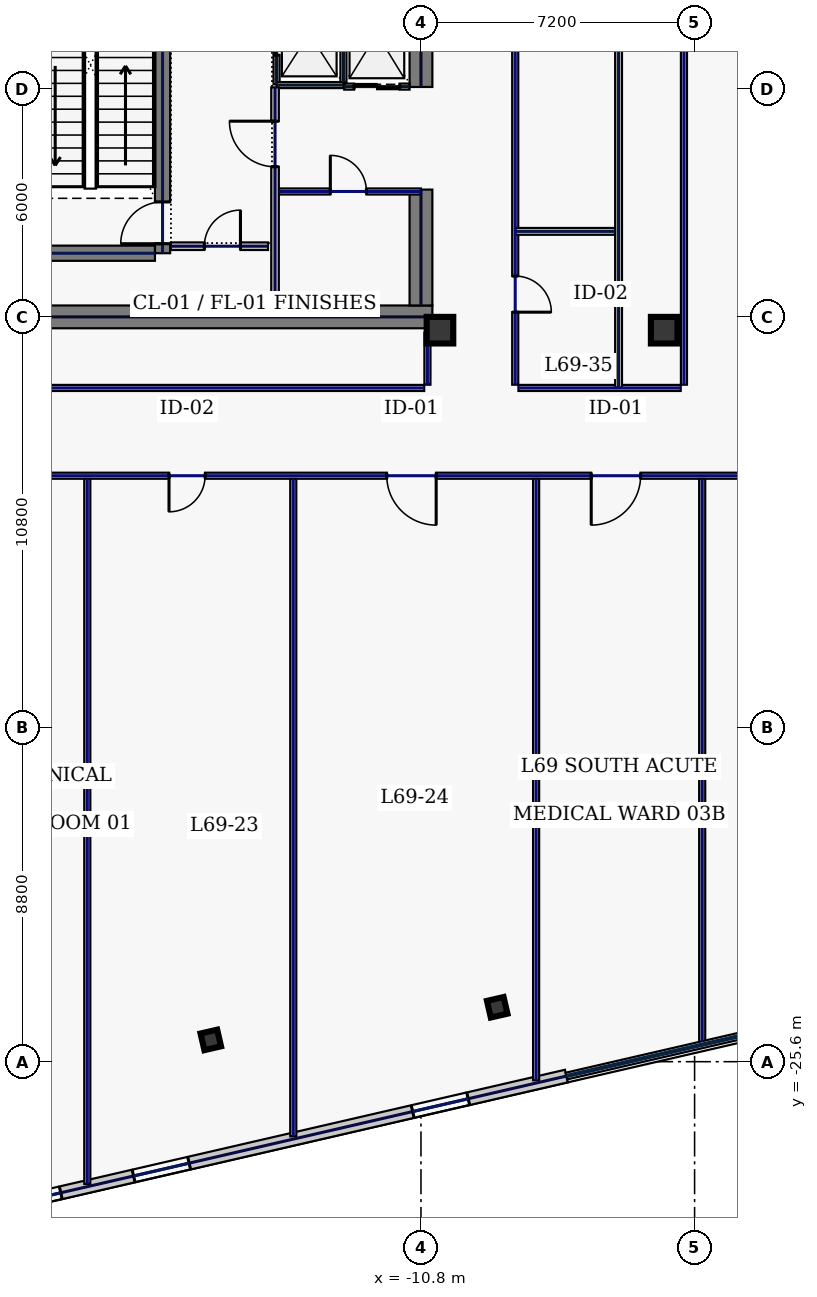
"""IFC4 building model, lengths in metres.
Left out: names, types, materials, properties, quantities, classifications, styles, units other than length and angle.
Written with IfcOpenShell. Run it as: python <this file> out.ifc"""

import sys

from ifc_helpers import new_model, si_unit, direction, frame, frame_2d, origin, origin_2d, place, context, subcontext, project, spatial, rectangle, hollow_rectangle, extrude, element, fill, save


model = new_model("IFC4")
c1 = context("Model", 3, precision=1e-05, world=origin(), true_north=direction((0.0, 1.0)))
c2 = subcontext(c1, "Body", "Model", "MODEL_VIEW")
j1 = project(units=[si_unit("LENGTHUNIT", "METRE"), si_unit("PLANEANGLEUNIT", "RADIAN")], contexts=[c1])
p1 = place(None, origin())
s1 = spatial("IfcSite", under=j1, at=p1, CompositionType="ELEMENT")
p2 = place(p1, origin())
s2 = spatial("IfcBuilding", under=s1, at=p2, CompositionType="ELEMENT")
p3 = place(p2, frame((0.0, 0.0, 297.0)))
s3 = spatial("IfcBuildingStorey", under=s2, at=p3, CompositionType="ELEMENT", Elevation=297.0)
p4 = place(p3, frame((-22.0, -6.0, 0.0), z_axis=(0.0, 0.0, 1.0), x_axis=(1.0, 0.0, 0.0)))
e1 = element("IfcWall", 1, at=p4, inside=s3, PredefinedType="SHEAR", context=c2, shape_type="SweptSolid", body=[
    extrude(rectangle(XDim=11.5, YDim=0.6, at=frame_2d((5.75, 0.0))), origin(), (0.0, 0.0, 1.0), 3.74),
])
p5 = place(p3, frame((-10.8, -5.7, 0.0), z_axis=(0.0, 0.0, 1.0), x_axis=(0.0, 1.0, 0.0)))
e2 = element("IfcWall", 2, at=p5, inside=s3, PredefinedType="SHEAR", context=c2, shape_type="SweptSolid", body=[
    extrude(rectangle(XDim=3.05, YDim=0.6, at=frame_2d((1.525, 0.0))), origin(), (0.0, 0.0, 1.0), 3.74),
])
p6 = place(p3, frame((-10.8, 0.05, 0.0), z_axis=(0.0, 0.0, 1.0), x_axis=(0.0, 1.0, 0.0)))
e3 = element("IfcWall", 3, at=p6, inside=s3, PredefinedType="SHEAR", context=c2, shape_type="SweptSolid", body=[
    extrude(rectangle(XDim=5.65, YDim=0.6, at=frame_2d((2.825, 0.0))), origin(), (0.0, 0.0, 1.0), 3.74),
])
p7 = place(p3, frame((-17.6, -4.325, 0.0), z_axis=(0.0, 0.0, 1.0), x_axis=(0.0, 1.0, 0.0)))
e4 = element("IfcWall", 4, at=p7, inside=s3, PredefinedType="SHEAR", context=c2, shape_type="SweptSolid", body=[
    extrude(rectangle(XDim=8.65, YDim=0.4, at=frame_2d((4.325, 0.0))), origin(), (0.0, 0.0, 1.0), 3.74),
])
p8 = place(p7, frame((0.25, 0.0, 0.0)))
e5 = element("IfcOpeningElement", 5, at=p8, cuts=e4, PredefinedType="OPENING", context=c2, shape_type="SweptSolid", body=[
    extrude(rectangle(XDim=1.1, YDim=2.2, at=frame_2d((0.55, 1.1))), frame((0.0, 0.21, 0.0), z_axis=(0.0, -1.0, 0.0), x_axis=(1.0, 0.0, 0.0)), (0.0, 0.0, 1.0), 0.42),
])
p9 = place(p3, frame((-21.2, -4.325, 0.0), z_axis=(0.0, 0.0, 1.0), x_axis=(1.0, 0.0, 0.0)))
e6 = element("IfcWall", 6, at=p9, inside=s3, PredefinedType="SHEAR", context=c2, shape_type="SweptSolid", body=[
    extrude(rectangle(XDim=3.4, YDim=0.4, at=frame_2d((1.7, 0.0))), origin(), (0.0, 0.0, 1.0), 3.74),
])
for number, where, z_axis, x_axis in (
    (7, (-10.3, -6.35, 0.0), (0.0, 0.0, 1.0), (1.0, 0.0, 0.0)),
    (8, (-4.4, -6.35, 0.0), (0.0, 0.0, 1.0), (1.0, 0.0, 0.0)),
):
    element("IfcColumn", number, at=place(p3, frame(where, z_axis=z_axis, x_axis=x_axis)), inside=s3, PredefinedType="COLUMN", context=c2, shape_type="SweptSolid", body=[
        extrude(hollow_rectangle(XDim=0.7, YDim=0.7, WallThickness=0.032, at=origin_2d()), origin(), (0.0, 0.0, 1.0), 3.74),
    ])
for number, where, z_axis, x_axis in (
    (9, (-16.33, -25.027, 0.0), (0.0, 0.0, 1.0), (0.974, 0.225, 0.0)),
    (10, (-8.794, -24.168, 0.0), (0.0, 0.0, 1.0), (0.974, 0.225, 0.0)),
):
    element("IfcColumn", number, at=place(p3, frame(where, z_axis=z_axis, x_axis=x_axis)), inside=s3, PredefinedType="COLUMN", context=c2, shape_type="SweptSolid", body=[
        extrude(hollow_rectangle(XDim=0.45, YDim=0.45, WallThickness=0.022, at=origin_2d()), origin(), (0.0, 0.0, 1.0), 3.74),
    ])
p10 = place(p3, frame((-24.03, -29.916, 0.0), z_axis=(0.0, 0.0, 1.0), x_axis=(0.974370978061, 0.224947098473, 0.0)))
e11 = element("IfcWall", 11, at=p10, inside=s3, PredefinedType="STANDARD", context=c2, shape_type="SweptSolid", body=[
    extrude(rectangle(XDim=17.506, YDim=0.34, at=frame_2d((8.753, 0.0))), origin(), (0.0, 0.0, 1.0), 3.74),
])
p11 = place(p10, frame((2.35, 0.0, 0.9)))
e12 = element("IfcOpeningElement", 12, at=p11, cuts=e11, PredefinedType="OPENING", context=c2, shape_type="SweptSolid", body=[
    extrude(rectangle(XDim=1.5, YDim=2.0, at=frame_2d((0.75, 1.0))), frame((0.0, 0.18, 0.0), z_axis=(0.0, -1.0, 0.0), x_axis=(1.0, 0.0, 0.0)), (0.0, 0.0, 1.0), 0.36),
])
p12 = place(p10, frame((5.817, 0.0, 0.9)))
e13 = element("IfcOpeningElement", 13, at=p12, cuts=e11, PredefinedType="OPENING", context=c2, shape_type="SweptSolid", body=[
    extrude(rectangle(XDim=1.5, YDim=2.0, at=frame_2d((0.75, 1.0))), frame((0.0, 0.18, 0.0), z_axis=(0.0, -1.0, 0.0), x_axis=(1.0, 0.0, 0.0)), (0.0, 0.0, 1.0), 0.36),
])
p13 = place(p10, frame((13.353, 0.0, 0.9)))
e14 = element("IfcOpeningElement", 14, at=p13, cuts=e11, PredefinedType="OPENING", context=c2, shape_type="SweptSolid", body=[
    extrude(rectangle(XDim=1.5, YDim=2.0, at=frame_2d((0.75, 1.0))), frame((0.0, 0.18, 0.0), z_axis=(0.0, -1.0, 0.0), x_axis=(1.0, 0.0, 0.0)), (0.0, 0.0, 1.0), 0.36),
])
p14 = place(p3, frame((-14.6, 0.12, 0.0), z_axis=(0.0, 0.0, 1.0), x_axis=(0.0, 1.0, 0.0)))
e15 = element("IfcWall", 15, at=p14, inside=s3, PredefinedType="PARTITIONING", context=c2, shape_type="SweptSolid", body=[
    extrude(rectangle(XDim=2.74, YDim=0.16, at=frame_2d((1.37, 0.0))), origin(), (0.0, 0.0, 1.0), 3.74),
])
p15 = place(p14, frame((0.77, 0.0, 0.0)))
e16 = element("IfcOpeningElement", 16, at=p15, cuts=e15, PredefinedType="OPENING", context=c2, shape_type="SweptSolid", body=[
    extrude(rectangle(XDim=1.2, YDim=2.2, at=frame_2d((0.6, 1.1))), frame((0.0, 0.09, 0.0), z_axis=(0.0, -1.0, 0.0), x_axis=(1.0, 0.0, 0.0)), (0.0, 0.0, 1.0), 0.18),
])
p16 = place(p3, frame((-14.6, 0.1, 0.0), z_axis=(0.0, 0.0, 1.0), x_axis=(1.0, 0.0, 0.0)))
e17 = element("IfcWall", 17, at=p16, inside=s3, PredefinedType="PARTITIONING", context=c2, shape_type="SweptSolid", body=[
    extrude(rectangle(XDim=1.76, YDim=0.16, at=frame_2d((0.88, 0.0))), origin(), (0.0, 0.0, 1.0), 3.74),
])
p17 = place(p3, frame((-12.84, 0.18, 0.0), z_axis=(0.0, 0.0, 1.0), x_axis=(0.0, 1.0, 0.0)))
e18 = element("IfcWall", 18, at=p17, inside=s3, PredefinedType="PARTITIONING", context=c2, shape_type="SweptSolid", body=[
    extrude(rectangle(XDim=2.62, YDim=0.16, at=frame_2d((1.31, 0.0))), origin(), (0.0, 0.0, 1.0), 3.74),
])
p18 = place(p3, frame((-12.82, 0.06, 0.0), z_axis=(0.0, 0.0, 1.0), x_axis=(1.0, 0.0, 0.0)))
e19 = element("IfcWall", 19, at=p18, inside=s3, PredefinedType="PARTITIONING", context=c2, shape_type="SweptSolid", body=[
    extrude(rectangle(XDim=1.72, YDim=0.16, at=frame_2d((0.86, 0.0))), origin(), (0.0, 0.0, 1.0), 3.74),
])
p19 = place(p18, frame((0.26, 0.0, 0.0)))
e20 = element("IfcOpeningElement", 20, at=p19, cuts=e19, PredefinedType="OPENING", context=c2, shape_type="SweptSolid", body=[
    extrude(rectangle(XDim=1.2, YDim=2.2, at=frame_2d((0.6, 1.1))), frame((0.0, 0.09, 0.0), z_axis=(0.0, -1.0, 0.0), x_axis=(1.0, 0.0, 0.0)), (0.0, 0.0, 1.0), 0.18),
])
p20 = place(p3, frame((-17.38, -4.14, 0.0), z_axis=(0.0, 0.0, 1.0), x_axis=(1.0, 0.0, 0.0)))
e21 = element("IfcWall", 21, at=p20, inside=s3, PredefinedType="SOLIDWALL", context=c2, shape_type="SweptSolid", body=[
    extrude(rectangle(XDim=2.555, YDim=0.2, at=frame_2d((1.277, 0.0))), origin(), (0.0, 0.0, 1.0), 3.74),
])
p21 = place(p20, frame((0.88, 0.0, 0.0)))
e22 = element("IfcOpeningElement", 22, at=p21, cuts=e21, PredefinedType="OPENING", context=c2, shape_type="SweptSolid", body=[
    extrude(rectangle(XDim=0.95, YDim=2.2, at=frame_2d((0.475, 1.1))), frame((0.0, 0.11, 0.0), z_axis=(0.0, -1.0, 0.0), x_axis=(1.0, 0.0, 0.0)), (0.0, 0.0, 1.0), 0.22),
])
p22 = place(p3, frame((-14.535, -2.7, 0.0), z_axis=(0.0, 0.0, 1.0), x_axis=(1.0, 0.0, 0.0)))
e23 = element("IfcWall", 23, at=p22, inside=s3, PredefinedType="PARTITIONING", context=c2, shape_type="SweptSolid", body=[
    extrude(rectangle(XDim=3.735, YDim=0.16, at=frame_2d((1.867, 0.0))), origin(), (0.0, 0.0, 1.0), 3.74),
])
p23 = place(p22, frame((1.35, 0.0, 0.0)))
e24 = element("IfcOpeningElement", 24, at=p23, cuts=e23, PredefinedType="OPENING", context=c2, shape_type="SweptSolid", body=[
    extrude(rectangle(XDim=0.95, YDim=2.2, at=frame_2d((0.475, 1.1))), frame((0.0, 0.09, 0.0), z_axis=(0.0, -1.0, 0.0), x_axis=(1.0, 0.0, 0.0)), (0.0, 0.0, 1.0), 0.18),
])
p24 = place(p3, frame((-14.64, -5.56, 0.0), z_axis=(0.0, 0.0, 1.0), x_axis=(0.0, 1.0, 0.0)))
e25 = element("IfcWall", 25, at=p24, inside=s3, PredefinedType="SOLIDWALL", context=c2, shape_type="SweptSolid", body=[
    extrude(rectangle(XDim=5.6, YDim=0.2, at=frame_2d((2.8, 0.0))), origin(), (0.0, 0.0, 1.0), 3.74),
])
p25 = place(p24, frame((3.51, 0.0, 0.0)))
e26 = element("IfcOpeningElement", 26, at=p25, cuts=e25, PredefinedType="OPENING", context=c2, shape_type="SweptSolid", body=[
    extrude(rectangle(XDim=1.2, YDim=2.2, at=frame_2d((0.6, 1.1))), frame((0.0, 0.11, 0.0), z_axis=(0.0, -1.0, 0.0), x_axis=(1.0, 0.0, 0.0)), (0.0, 0.0, 1.0), 0.22),
])
p26 = place(p3, frame((12.535, -10.18, 0.0), z_axis=(0.0, 0.0, 1.0), x_axis=(-1.0, 0.0, 0.0)))
e27 = element("IfcWall", 27, at=p26, inside=s3, PredefinedType="PARTITIONING", context=c2, shape_type="SweptSolid", body=[
    extrude(rectangle(XDim=36.68, YDim=0.16, at=frame_2d((18.34, 0.0))), origin(), (0.0, 0.0, 1.0), 3.74),
])
p27 = place(p26, frame((33.856, 0.0, 0.0)))
e28 = element("IfcOpeningElement", 28, at=p27, cuts=e27, PredefinedType="OPENING", context=c2, shape_type="SweptSolid", body=[
    extrude(rectangle(XDim=0.95, YDim=2.2, at=frame_2d((0.475, 1.1))), frame((0.0, 0.09, 0.0), z_axis=(0.0, -1.0, 0.0), x_axis=(1.0, 0.0, 0.0)), (0.0, 0.0, 1.0), 0.18),
])
p28 = place(p26, frame((29.015, 0.0, 0.0)))
e29 = element("IfcOpeningElement", 29, at=p28, cuts=e27, PredefinedType="OPENING", context=c2, shape_type="SweptSolid", body=[
    extrude(rectangle(XDim=0.95, YDim=2.2, at=frame_2d((0.475, 1.1))), frame((0.0, 0.09, 0.0), z_axis=(0.0, -1.0, 0.0), x_axis=(1.0, 0.0, 0.0)), (0.0, 0.0, 1.0), 0.18),
])
p29 = place(p26, frame((22.935, 0.0, 0.0)))
e30 = element("IfcOpeningElement", 30, at=p29, cuts=e27, PredefinedType="OPENING", context=c2, shape_type="SweptSolid", body=[
    extrude(rectangle(XDim=1.3, YDim=2.2, at=frame_2d((0.65, 1.1))), frame((0.0, 0.09, 0.0), z_axis=(0.0, -1.0, 0.0), x_axis=(1.0, 0.0, 0.0)), (0.0, 0.0, 1.0), 0.18),
])
p30 = place(p26, frame((17.555, 0.0, 0.0)))
e31 = element("IfcOpeningElement", 31, at=p30, cuts=e27, PredefinedType="OPENING", context=c2, shape_type="SweptSolid", body=[
    extrude(rectangle(XDim=1.3, YDim=2.2, at=frame_2d((0.65, 1.1))), frame((0.0, 0.09, 0.0), z_axis=(0.0, -1.0, 0.0), x_axis=(1.0, 0.0, 0.0)), (0.0, 0.0, 1.0), 0.18),
])
p31 = place(p26, frame((9.97, 0.0, 0.0)))
e32 = element("IfcOpeningElement", 32, at=p31, cuts=e27, PredefinedType="OPENING", context=c2, shape_type="SweptSolid", body=[
    extrude(rectangle(XDim=1.3, YDim=2.2, at=frame_2d((0.65, 1.1))), frame((0.0, 0.09, 0.0), z_axis=(0.0, -1.0, 0.0), x_axis=(1.0, 0.0, 0.0)), (0.0, 0.0, 1.0), 0.18),
])
p32 = place(p26, frame((2.329, 0.0, 0.0)))
e33 = element("IfcOpeningElement", 33, at=p32, cuts=e27, PredefinedType="OPENING", context=c2, shape_type="SweptSolid", body=[
    extrude(rectangle(XDim=0.95, YDim=2.2, at=frame_2d((0.475, 1.1))), frame((0.0, 0.09, 0.0), z_axis=(0.0, -1.0, 0.0), x_axis=(1.0, 0.0, 0.0)), (0.0, 0.0, 1.0), 0.18),
])
p33 = place(p3, frame((-3.88, -7.785, 0.0), z_axis=(0.0, 0.0, 1.0), x_axis=(0.0, 1.0, 0.0)))
e34 = element("IfcWall", 34, at=p33, inside=s3, PredefinedType="PARTITIONING", context=c2, shape_type="SweptSolid", body=[
    extrude(rectangle(XDim=15.67, YDim=0.16, at=frame_2d((7.835, 0.0))), origin(), (0.0, 0.0, 1.0), 3.74),
])
p34 = place(p3, frame((-8.32, 7.885, 0.0), z_axis=(0.0, 0.0, 1.0), x_axis=(0.0, -1.0, 0.0)))
e35 = element("IfcWall", 35, at=p34, inside=s3, PredefinedType="PARTITIONING", context=c2, shape_type="SweptSolid", body=[
    extrude(rectangle(XDim=15.67, YDim=0.16, at=frame_2d((7.835, 0.0))), origin(), (0.0, 0.0, 1.0), 3.74),
])
p35 = place(p34, frame((12.811, 0.0, 0.0)))
e36 = element("IfcOpeningElement", 36, at=p35, cuts=e35, PredefinedType="OPENING", context=c2, shape_type="SweptSolid", body=[
    extrude(rectangle(XDim=0.95, YDim=2.2, at=frame_2d((0.475, 1.1))), frame((0.0, 0.09, 0.0), z_axis=(0.0, -1.0, 0.0), x_axis=(1.0, 0.0, 0.0)), (0.0, 0.0, 1.0), 0.18),
])
p36 = place(p34, frame((5.579, 0.0, 0.0)))
e37 = element("IfcOpeningElement", 37, at=p36, cuts=e35, PredefinedType="OPENING", context=c2, shape_type="SweptSolid", body=[
    extrude(rectangle(XDim=0.95, YDim=2.2, at=frame_2d((0.475, 1.1))), frame((0.0, 0.09, 0.0), z_axis=(0.0, -1.0, 0.0), x_axis=(1.0, 0.0, 0.0)), (0.0, 0.0, 1.0), 0.18),
])
p37 = place(p3, frame((-8.235, -7.87, 0.0), z_axis=(0.0, 0.0, 1.0), x_axis=(1.0, 0.0, 0.0)))
e38 = element("IfcWall", 38, at=p37, inside=s3, PredefinedType="PARTITIONING", context=c2, shape_type="SweptSolid", body=[
    extrude(rectangle(XDim=4.27, YDim=0.16, at=frame_2d((2.135, 0.0))), origin(), (0.0, 0.0, 1.0), 3.74),
])
p38 = place(p3, frame((-10.63, -7.785, 0.0), z_axis=(0.0, 0.0, 1.0), x_axis=(0.0, 1.0, 0.0)))
e39 = element("IfcWall", 39, at=p38, inside=s3, PredefinedType="PARTITIONING", context=c2, shape_type="SweptSolid", body=[
    extrude(rectangle(XDim=1.365, YDim=0.16, at=frame_2d((0.683, 0.0))), origin(), (0.0, 0.0, 1.0), 3.74),
])
p39 = place(p3, frame((-21.915, -7.87, 0.0), z_axis=(0.0, 0.0, 1.0), x_axis=(1.0, 0.0, 0.0)))
e40 = element("IfcWall", 40, at=p39, inside=s3, PredefinedType="PARTITIONING", context=c2, shape_type="SweptSolid", body=[
    extrude(rectangle(XDim=11.2, YDim=0.16, at=frame_2d((5.6, 0.0))), origin(), (0.0, 0.0, 1.0), 3.74),
])
p40 = place(p3, frame((-19.58, -28.817, 0.0), z_axis=(0.0, 0.0, 1.0), x_axis=(0.0, 1.0, 0.0)))
e41 = element("IfcWall", 41, at=p40, inside=s3, PredefinedType="PARTITIONING", context=c2, shape_type="SweptSolid", body=[
    extrude(rectangle(XDim=18.552, YDim=0.16, at=frame_2d((9.276, 0.0))), origin(), (0.0, 0.0, 1.0), 3.74),
])
p41 = place(p3, frame((-14.16, -27.566, 0.0), z_axis=(0.0, 0.0, 1.0), x_axis=(0.0, 1.0, 0.0)))
e42 = element("IfcWall", 42, at=p41, inside=s3, PredefinedType="PARTITIONING", context=c2, shape_type="SweptSolid", body=[
    extrude(rectangle(XDim=17.301, YDim=0.16, at=frame_2d((8.65, 0.0))), origin(), (0.0, 0.0, 1.0), 3.74),
])
p42 = place(p3, frame((-3.4, -25.082, 0.0), z_axis=(0.0, 0.0, 1.0), x_axis=(0.0, 1.0, 0.0)))
e43 = element("IfcWall", 43, at=p42, inside=s3, PredefinedType="PARTITIONING", context=c2, shape_type="SweptSolid", body=[
    extrude(rectangle(XDim=14.817, YDim=0.16, at=frame_2d((7.408, 0.0))), origin(), (0.0, 0.0, 1.0), 3.335),
])
p43 = place(p3, frame((-7.77, -26.091, 0.0), z_axis=(0.0, 0.0, 1.0), x_axis=(0.0, 1.0, 0.0)))
e44 = element("IfcWall", 44, at=p43, inside=s3, PredefinedType="PARTITIONING", context=c2, shape_type="SweptSolid", body=[
    extrude(rectangle(XDim=15.826, YDim=0.16, at=frame_2d((7.913, 0.0))), origin(), (0.0, 0.0, 1.0), 3.74),
])
p44 = place(p3, frame((-5.6, -7.865, 0.0), z_axis=(0.0, 0.0, 1.0), x_axis=(0.0, 1.0, 0.0)))
e45 = element("IfcWall", 45, at=p44, inside=s3, PredefinedType="PARTITIONING", context=c2, shape_type="SweptSolid", body=[
    extrude(rectangle(XDim=15.83, YDim=0.18, at=frame_2d((7.915, 0.0))), origin(), (0.0, 0.0, 1.0), 3.74),
])
p45 = place(p3, frame((-8.315, -3.75, 0.0), z_axis=(0.0, 0.0, 1.0), x_axis=(1.0, 0.0, 0.0)))
e46 = element("IfcWall", 46, at=p45, inside=s3, PredefinedType="PARTITIONING", context=c2, shape_type="SweptSolid", body=[
    extrude(rectangle(XDim=2.62, YDim=0.18, at=frame_2d((1.31, 0.0))), origin(), (0.0, 0.0, 1.0), 3.74),
])
p46 = place(p11, origin())
e47 = element("IfcWindow", 47, at=p46, inside=s3, PartitioningType="SINGLE_PANEL", PredefinedType="WINDOW", context=c2, shape_type="SweptSolid", body=[
    extrude(rectangle(XDim=1.5, YDim=2.0, at=frame_2d((0.75, 1.0))), frame((0.0, 0.03, 0.0), z_axis=(0.0, -1.0, 0.0), x_axis=(1.0, 0.0, 0.0)), (0.0, 0.0, 1.0), 0.06),
])
fill(e12, e47)
p47 = place(p12, origin())
e48 = element("IfcWindow", 48, at=p47, inside=s3, PartitioningType="SINGLE_PANEL", PredefinedType="WINDOW", context=c2, shape_type="SweptSolid", body=[
    extrude(rectangle(XDim=1.5, YDim=2.0, at=frame_2d((0.75, 1.0))), frame((0.0, 0.03, 0.0), z_axis=(0.0, -1.0, 0.0), x_axis=(1.0, 0.0, 0.0)), (0.0, 0.0, 1.0), 0.06),
])
fill(e13, e48)
p48 = place(p13, origin())
e49 = element("IfcWindow", 49, at=p48, inside=s3, PartitioningType="SINGLE_PANEL", PredefinedType="WINDOW", context=c2, shape_type="SweptSolid", body=[
    extrude(rectangle(XDim=1.5, YDim=2.0, at=frame_2d((0.75, 1.0))), frame((0.0, 0.03, 0.0), z_axis=(0.0, -1.0, 0.0), x_axis=(1.0, 0.0, 0.0)), (0.0, 0.0, 1.0), 0.06),
])
fill(e14, e49)
p49 = place(p8, origin())
e50 = element("IfcDoor", 50, at=p49, inside=s3, OperationType="SINGLE_SWING_LEFT", PredefinedType="DOOR", context=c2, shape_type="SweptSolid", body=[
    extrude(rectangle(XDim=1.1, YDim=2.2, at=frame_2d((0.55, 1.1))), frame((0.0, 0.025, 0.0), z_axis=(0.0, -1.0, 0.0), x_axis=(1.0, 0.0, 0.0)), (0.0, 0.0, 1.0), 0.05),
])
fill(e5, e50)
p50 = place(p15, origin())
e51 = element("IfcDoor", 51, at=p50, inside=s3, OperationType="SLIDING_TO_LEFT", PredefinedType="DOOR", context=c2, shape_type="SweptSolid", body=[
    extrude(rectangle(XDim=1.2, YDim=2.2, at=frame_2d((0.6, 1.1))), frame((0.0, 0.025, 0.0), z_axis=(0.0, -1.0, 0.0), x_axis=(1.0, 0.0, 0.0)), (0.0, 0.0, 1.0), 0.05),
])
fill(e16, e51)
p51 = place(p19, origin())
e52 = element("IfcDoor", 52, at=p51, inside=s3, OperationType="SLIDING_TO_LEFT", PredefinedType="DOOR", context=c2, shape_type="SweptSolid", body=[
    extrude(rectangle(XDim=1.2, YDim=2.2, at=frame_2d((0.6, 1.1))), frame((0.0, 0.025, 0.0), z_axis=(0.0, -1.0, 0.0), x_axis=(1.0, 0.0, 0.0)), (0.0, 0.0, 1.0), 0.05),
])
fill(e20, e52)
p52 = place(p21, origin())
e53 = element("IfcDoor", 53, at=p52, inside=s3, OperationType="SINGLE_SWING_RIGHT", PredefinedType="DOOR", context=c2, shape_type="SweptSolid", body=[
    extrude(rectangle(XDim=0.95, YDim=2.2, at=frame_2d((0.475, 1.1))), frame((0.0, 0.025, 0.0), z_axis=(0.0, -1.0, 0.0), x_axis=(1.0, 0.0, 0.0)), (0.0, 0.0, 1.0), 0.05),
])
fill(e22, e53)
p53 = place(p23, origin())
e54 = element("IfcDoor", 54, at=p53, inside=s3, OperationType="SINGLE_SWING_LEFT", PredefinedType="DOOR", context=c2, shape_type="SweptSolid", body=[
    extrude(rectangle(XDim=0.95, YDim=2.2, at=frame_2d((0.475, 1.1))), frame((0.0, 0.025, 0.0), z_axis=(0.0, -1.0, 0.0), x_axis=(1.0, 0.0, 0.0)), (0.0, 0.0, 1.0), 0.05),
])
fill(e24, e54)
p54 = place(p25, origin())
e55 = element("IfcDoor", 55, at=p54, inside=s3, OperationType="SINGLE_SWING_RIGHT", PredefinedType="DOOR", context=c2, shape_type="SweptSolid", body=[
    extrude(rectangle(XDim=1.2, YDim=2.2, at=frame_2d((0.6, 1.1))), frame((0.0, 0.025, 0.0), z_axis=(0.0, -1.0, 0.0), x_axis=(1.0, 0.0, 0.0)), (0.0, 0.0, 1.0), 0.05),
])
fill(e26, e55)
p55 = place(p28, origin())
e56 = element("IfcDoor", 56, at=p55, inside=s3, OperationType="SINGLE_SWING_RIGHT", PredefinedType="DOOR", context=c2, shape_type="SweptSolid", body=[
    extrude(rectangle(XDim=0.95, YDim=2.2, at=frame_2d((0.475, 1.1))), frame((0.0, 0.025, 0.0), z_axis=(0.0, -1.0, 0.0), x_axis=(1.0, 0.0, 0.0)), (0.0, 0.0, 1.0), 0.05),
])
fill(e29, e56)
p56 = place(p29, origin())
e57 = element("IfcDoor", 57, at=p56, inside=s3, OperationType="SINGLE_SWING_LEFT", PredefinedType="DOOR", context=c2, shape_type="SweptSolid", body=[
    extrude(rectangle(XDim=1.3, YDim=2.2, at=frame_2d((0.65, 1.1))), frame((0.0, 0.025, 0.0), z_axis=(0.0, -1.0, 0.0), x_axis=(1.0, 0.0, 0.0)), (0.0, 0.0, 1.0), 0.05),
])
fill(e30, e57)
p57 = place(p30, origin())
e58 = element("IfcDoor", 58, at=p57, inside=s3, OperationType="SINGLE_SWING_RIGHT", PredefinedType="DOOR", context=c2, shape_type="SweptSolid", body=[
    extrude(rectangle(XDim=1.3, YDim=2.2, at=frame_2d((0.65, 1.1))), frame((0.0, 0.025, 0.0), z_axis=(0.0, -1.0, 0.0), x_axis=(1.0, 0.0, 0.0)), (0.0, 0.0, 1.0), 0.05),
])
fill(e31, e58)
p58 = place(p35, origin())
e59 = element("IfcDoor", 59, at=p58, inside=s3, OperationType="SINGLE_SWING_RIGHT", PredefinedType="DOOR", context=c2, shape_type="SweptSolid", body=[
    extrude(rectangle(XDim=0.95, YDim=2.2, at=frame_2d((0.475, 1.1))), frame((0.0, 0.025, 0.0), z_axis=(0.0, -1.0, 0.0), x_axis=(1.0, 0.0, 0.0)), (0.0, 0.0, 1.0), 0.05),
])
fill(e36, e59)
save(model, sys.argv[1])
